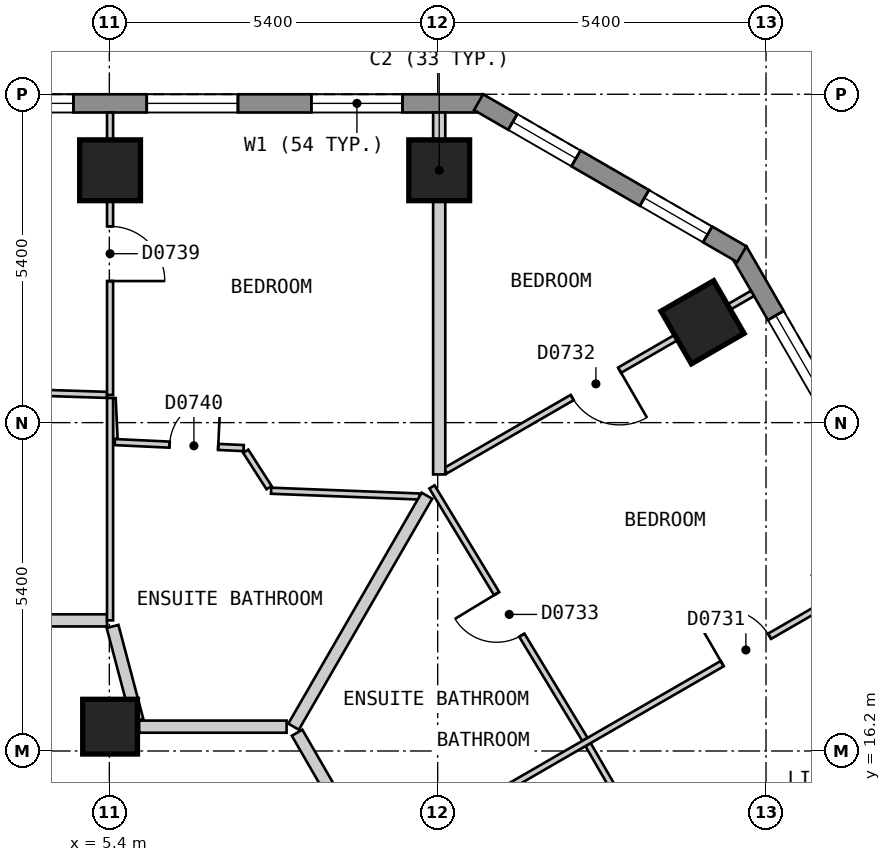
"""IFC4 building model, lengths in metres.
Left out: names, types, materials, properties, quantities, classifications, styles, units other than length and angle.
Written with IfcOpenShell. Run it as: python <this file> out.ifc"""

import sys

from ifc_helpers import new_model, si_unit, direction, frame, frame_2d, origin, origin_2d, place, context, subcontext, project, spatial, polyline, rectangle, outline, extrude, element, fill, save


model = new_model("IFC4")
c1 = context("Model", 3, precision=1e-05, world=origin(), true_north=direction((0.0, 1.0)))
c2 = subcontext(c1, "Body", "Model", "MODEL_VIEW")
j1 = project(units=[si_unit("LENGTHUNIT", "METRE"), si_unit("PLANEANGLEUNIT", "RADIAN")], contexts=[c1])
p1 = place(None, origin())
s1 = spatial("IfcSite", under=j1, at=p1, CompositionType="ELEMENT")
p2 = place(p1, origin())
s2 = spatial("IfcBuilding", under=s1, at=p2, CompositionType="ELEMENT")
p3 = place(p2, frame((0.0, 0.0, 99.0)))
s3 = spatial("IfcBuildingStorey", under=s2, at=p3, CompositionType="ELEMENT", Elevation=99.0)
for number, where, z_axis, x_axis in (
    (1, (10.825, 25.75, 0.0), (0.0, 0.0, 1.0), (-1.0, 0.0, 0.0)),
    (2, (5.412, 25.75, 0.0), (0.0, 0.0, 1.0), (-1.0, 0.0, 0.0)),
    (3, (15.156, 23.25, 0.0), (0.0, 0.0, 1.0), (-0.5, 0.866, 0.0)),
):
    element("IfcColumn", number, at=place(p3, frame(where, z_axis=z_axis, x_axis=x_axis)), inside=s3, PredefinedType="COLUMN", context=c2, shape_type="SweptSolid", body=[
        extrude(rectangle(XDim=1.0, YDim=1.0, at=origin_2d()), origin(), (0.0, 0.0, 1.0), 3.0),
    ])
p4 = place(p3, frame((5.412, 16.6, 0.0), z_axis=(0.0, 0.0, 1.0), x_axis=(-1.0, 0.0, 0.0)))
e4 = element("IfcColumn", 4, at=p4, inside=s3, PredefinedType="COLUMN", context=c2, shape_type="SweptSolid", body=[
    extrude(rectangle(XDim=0.9, YDim=0.9, at=origin_2d()), origin(), (0.0, 0.0, 1.0), 3.0),
])
p5 = place(p3, frame((11.547, 26.85, 0.0), z_axis=(0.0, 0.0, 1.0), x_axis=(-1.0, 0.0, 0.0)))
e5 = element("IfcWall", 5, at=p5, inside=s3, PredefinedType="SOLIDWALL", context=c2, shape_type="SweptSolid", body=[
    extrude(outline(polyline([(0.0, -0.15), (23.094, -0.15), (23.014, 0.15), (0.08, 0.15), (0.0, -0.15)])), origin(), (0.0, 0.0, 1.0), 2.7),
])
p6 = place(p5, frame((1.325, 0.0, 0.15)))
e6 = element("IfcOpeningElement", 6, at=p6, cuts=e5, PredefinedType="OPENING", context=c2, shape_type="SweptSolid", body=[
    extrude(rectangle(XDim=1.5, YDim=2.1, at=frame_2d((0.75, 1.05))), frame((0.0, 0.16, 0.0), z_axis=(0.0, -1.0, 0.0), x_axis=(1.0, 0.0, 0.0)), (0.0, 0.0, 1.0), 0.32),
])
p7 = place(p5, frame((4.032, 0.0, 0.15)))
e7 = element("IfcOpeningElement", 7, at=p7, cuts=e5, PredefinedType="OPENING", context=c2, shape_type="SweptSolid", body=[
    extrude(rectangle(XDim=1.5, YDim=2.1, at=frame_2d((0.75, 1.05))), frame((0.0, 0.16, 0.0), z_axis=(0.0, -1.0, 0.0), x_axis=(1.0, 0.0, 0.0)), (0.0, 0.0, 1.0), 0.32),
])
p8 = place(p5, frame((6.738, 0.0, 0.15)))
e8 = element("IfcOpeningElement", 8, at=p8, cuts=e5, PredefinedType="OPENING", context=c2, shape_type="SweptSolid", body=[
    extrude(rectangle(XDim=1.5, YDim=2.1, at=frame_2d((0.75, 1.05))), frame((0.0, 0.16, 0.0), z_axis=(0.0, -1.0, 0.0), x_axis=(1.0, 0.0, 0.0)), (0.0, 0.0, 1.0), 0.32),
])
p9 = place(p5, frame((9.445, 0.0, 0.15)))
e9 = element("IfcOpeningElement", 9, at=p9, cuts=e5, PredefinedType="OPENING", context=c2, shape_type="SweptSolid", body=[
    extrude(rectangle(XDim=1.5, YDim=2.1, at=frame_2d((0.75, 1.05))), frame((0.0, 0.16, 0.0), z_axis=(0.0, -1.0, 0.0), x_axis=(1.0, 0.0, 0.0)), (0.0, 0.0, 1.0), 0.32),
])
p10 = place(p5, frame((12.151, 0.0, 0.15)))
e10 = element("IfcOpeningElement", 10, at=p10, cuts=e5, PredefinedType="OPENING", context=c2, shape_type="SweptSolid", body=[
    extrude(rectangle(XDim=1.5, YDim=2.1, at=frame_2d((0.75, 1.05))), frame((0.0, 0.16, 0.0), z_axis=(0.0, -1.0, 0.0), x_axis=(1.0, 0.0, 0.0)), (0.0, 0.0, 1.0), 0.32),
])
p11 = place(p5, frame((14.858, 0.0, 0.15)))
e11 = element("IfcOpeningElement", 11, at=p11, cuts=e5, PredefinedType="OPENING", context=c2, shape_type="SweptSolid", body=[
    extrude(rectangle(XDim=1.5, YDim=2.1, at=frame_2d((0.75, 1.05))), frame((0.0, 0.16, 0.0), z_axis=(0.0, -1.0, 0.0), x_axis=(1.0, 0.0, 0.0)), (0.0, 0.0, 1.0), 0.32),
])
p12 = place(p5, frame((17.564, 0.0, 0.15)))
e12 = element("IfcOpeningElement", 12, at=p12, cuts=e5, PredefinedType="OPENING", context=c2, shape_type="SweptSolid", body=[
    extrude(rectangle(XDim=1.5, YDim=2.1, at=frame_2d((0.75, 1.05))), frame((0.0, 0.16, 0.0), z_axis=(0.0, -1.0, 0.0), x_axis=(1.0, 0.0, 0.0)), (0.0, 0.0, 1.0), 0.32),
])
p13 = place(p5, frame((20.271, 0.0, 0.15)))
e13 = element("IfcOpeningElement", 13, at=p13, cuts=e5, PredefinedType="OPENING", context=c2, shape_type="SweptSolid", body=[
    extrude(rectangle(XDim=1.5, YDim=2.1, at=frame_2d((0.75, 1.05))), frame((0.0, 0.16, 0.0), z_axis=(0.0, -1.0, 0.0), x_axis=(1.0, 0.0, 0.0)), (0.0, 0.0, 1.0), 0.32),
])
p14 = place(p3, frame((29.027, 1.425, 0.0), z_axis=(0.0, 0.0, 1.0), x_axis=(-0.500027479704, 0.866009537788, 0.0)))
e14 = element("IfcWall", 14, at=p14, inside=s3, PredefinedType="SOLIDWALL", context=c2, shape_type="SweptSolid", body=[
    extrude(outline(polyline([(0.0, -0.15), (26.559, -0.15), (26.478, 0.15), (0.08, 0.15), (0.0, -0.15)])), origin(), (0.0, 0.0, 1.0), 2.7),
])
p15 = place(p14, frame((1.227, 0.0, 0.15)))
e15 = element("IfcOpeningElement", 15, at=p15, cuts=e14, PredefinedType="OPENING", context=c2, shape_type="SweptSolid", body=[
    extrude(rectangle(XDim=1.5, YDim=2.1, at=frame_2d((0.75, 1.05))), frame((0.0, 0.16, 0.0), z_axis=(0.0, -1.0, 0.0), x_axis=(1.0, 0.0, 0.0)), (0.0, 0.0, 1.0), 0.32),
])
p16 = place(p14, frame((3.738, 0.0, 0.15)))
e16 = element("IfcOpeningElement", 16, at=p16, cuts=e14, PredefinedType="OPENING", context=c2, shape_type="SweptSolid", body=[
    extrude(rectangle(XDim=1.5, YDim=2.1, at=frame_2d((0.75, 1.05))), frame((0.0, 0.16, 0.0), z_axis=(0.0, -1.0, 0.0), x_axis=(1.0, 0.0, 0.0)), (0.0, 0.0, 1.0), 0.32),
])
p17 = place(p14, frame((6.25, 0.0, 0.15)))
e17 = element("IfcOpeningElement", 17, at=p17, cuts=e14, PredefinedType="OPENING", context=c2, shape_type="SweptSolid", body=[
    extrude(rectangle(XDim=1.5, YDim=2.1, at=frame_2d((0.75, 1.05))), frame((0.0, 0.16, 0.0), z_axis=(0.0, -1.0, 0.0), x_axis=(1.0, 0.0, 0.0)), (0.0, 0.0, 1.0), 0.32),
])
p18 = place(p14, frame((8.761, 0.0, 0.15)))
e18 = element("IfcOpeningElement", 18, at=p18, cuts=e14, PredefinedType="OPENING", context=c2, shape_type="SweptSolid", body=[
    extrude(rectangle(XDim=1.5, YDim=2.1, at=frame_2d((0.75, 1.05))), frame((0.0, 0.16, 0.0), z_axis=(0.0, -1.0, 0.0), x_axis=(1.0, 0.0, 0.0)), (0.0, 0.0, 1.0), 0.32),
])
p19 = place(p14, frame((11.273, 0.0, 0.15)))
e19 = element("IfcOpeningElement", 19, at=p19, cuts=e14, PredefinedType="OPENING", context=c2, shape_type="SweptSolid", body=[
    extrude(rectangle(XDim=1.5, YDim=2.1, at=frame_2d((0.75, 1.05))), frame((0.0, 0.16, 0.0), z_axis=(0.0, -1.0, 0.0), x_axis=(1.0, 0.0, 0.0)), (0.0, 0.0, 1.0), 0.32),
])
p20 = place(p14, frame((13.785, 0.0, 0.15)))
e20 = element("IfcOpeningElement", 20, at=p20, cuts=e14, PredefinedType="OPENING", context=c2, shape_type="SweptSolid", body=[
    extrude(rectangle(XDim=1.5, YDim=2.1, at=frame_2d((0.75, 1.05))), frame((0.0, 0.16, 0.0), z_axis=(0.0, -1.0, 0.0), x_axis=(1.0, 0.0, 0.0)), (0.0, 0.0, 1.0), 0.32),
])
p21 = place(p14, frame((16.296, 0.0, 0.15)))
e21 = element("IfcOpeningElement", 21, at=p21, cuts=e14, PredefinedType="OPENING", context=c2, shape_type="SweptSolid", body=[
    extrude(rectangle(XDim=1.5, YDim=2.1, at=frame_2d((0.75, 1.05))), frame((0.0, 0.16, 0.0), z_axis=(0.0, -1.0, 0.0), x_axis=(1.0, 0.0, 0.0)), (0.0, 0.0, 1.0), 0.32),
])
p22 = place(p14, frame((18.807, 0.0, 0.15)))
e22 = element("IfcOpeningElement", 22, at=p22, cuts=e14, PredefinedType="OPENING", context=c2, shape_type="SweptSolid", body=[
    extrude(rectangle(XDim=1.5, YDim=2.1, at=frame_2d((0.75, 1.05))), frame((0.0, 0.16, 0.0), z_axis=(0.0, -1.0, 0.0), x_axis=(1.0, 0.0, 0.0)), (0.0, 0.0, 1.0), 0.32),
])
p23 = place(p14, frame((21.319, 0.0, 0.15)))
e23 = element("IfcOpeningElement", 23, at=p23, cuts=e14, PredefinedType="OPENING", context=c2, shape_type="SweptSolid", body=[
    extrude(rectangle(XDim=1.5, YDim=2.1, at=frame_2d((0.75, 1.05))), frame((0.0, 0.16, 0.0), z_axis=(0.0, -1.0, 0.0), x_axis=(1.0, 0.0, 0.0)), (0.0, 0.0, 1.0), 0.32),
])
p24 = place(p14, frame((23.831, 0.0, 0.15)))
e24 = element("IfcOpeningElement", 24, at=p24, cuts=e14, PredefinedType="OPENING", context=c2, shape_type="SweptSolid", body=[
    extrude(rectangle(XDim=1.5, YDim=2.1, at=frame_2d((0.75, 1.05))), frame((0.0, 0.16, 0.0), z_axis=(0.0, -1.0, 0.0), x_axis=(1.0, 0.0, 0.0)), (0.0, 0.0, 1.0), 0.32),
])
p25 = place(p3, frame((15.802, 24.37, 0.0), z_axis=(0.0, 0.0, 1.0), x_axis=(-0.866022959057, 0.500004234368, 0.0)))
e25 = element("IfcWall", 25, at=p25, inside=s3, PredefinedType="SOLIDWALL", context=c2, shape_type="SweptSolid", body=[
    extrude(outline(polyline([(0.0, -0.15), (5.0, -0.15), (4.92, 0.15), (0.08, 0.15), (0.0, -0.15)])), origin(), (0.0, 0.0, 1.0), 2.7),
])
p26 = place(p25, frame((0.65, 0.0, 0.15)))
e26 = element("IfcOpeningElement", 26, at=p26, cuts=e25, PredefinedType="OPENING", context=c2, shape_type="SweptSolid", body=[
    extrude(rectangle(XDim=1.2, YDim=2.1, at=frame_2d((0.6, 1.05))), frame((0.0, 0.16, 0.0), z_axis=(0.0, -1.0, 0.0), x_axis=(1.0, 0.0, 0.0)), (0.0, 0.0, 1.0), 0.32),
])
p27 = place(p25, frame((3.15, 0.0, 0.15)))
e27 = element("IfcOpeningElement", 27, at=p27, cuts=e25, PredefinedType="OPENING", context=c2, shape_type="SweptSolid", body=[
    extrude(rectangle(XDim=1.2, YDim=2.1, at=frame_2d((0.6, 1.05))), frame((0.0, 0.16, 0.0), z_axis=(0.0, -1.0, 0.0), x_axis=(1.0, 0.0, 0.0)), (0.0, 0.0, 1.0), 0.32),
])
p28 = place(p3, frame((5.453, 18.248, 0.0), z_axis=(0.0, 0.0, 1.0), x_axis=(0.255687088482, -0.9667595941, 0.0)))
e28 = element("IfcWall", 28, at=p28, inside=s3, PredefinedType="PARTITIONING", context=c2, shape_type="SweptSolid", body=[
    extrude(rectangle(XDim=1.6, YDim=0.2, at=frame_2d((0.8, 0.0))), origin(), (0.0, 0.0, 1.0), 2.7),
])
p29 = place(p3, frame((8.488, 16.5, 0.0), z_axis=(0.0, 0.0, 1.0), x_axis=(0.499986836607, -0.86603300354, 0.0)))
e29 = element("IfcWall", 29, at=p29, inside=s3, PredefinedType="PARTITIONING", context=c2, shape_type="SweptSolid", body=[
    extrude(rectangle(XDim=20.09, YDim=0.2, at=frame_2d((10.045, 0.0))), origin(), (0.0, 0.0, 1.0), 2.7),
])
p30 = place(p29, frame((14.569, 0.0, 0.0)))
e30 = element("IfcOpeningElement", 30, at=p30, cuts=e29, PredefinedType="OPENING", context=c2, shape_type="SweptSolid", body=[
    extrude(rectangle(XDim=1.0, YDim=2.1, at=frame_2d((0.5, 1.05))), frame((0.0, 0.11, 0.0), z_axis=(0.0, -1.0, 0.0), x_axis=(1.0, 0.0, 0.0)), (0.0, 0.0, 1.0), 0.22),
])
p31 = place(p29, frame((4.547, 0.0, 0.0)))
e31 = element("IfcOpeningElement", 31, at=p31, cuts=e29, PredefinedType="OPENING", context=c2, shape_type="SweptSolid", body=[
    extrude(rectangle(XDim=1.0, YDim=2.1, at=frame_2d((0.5, 1.05))), frame((0.0, 0.11, 0.0), z_axis=(0.0, -1.0, 0.0), x_axis=(1.0, 0.0, 0.0)), (0.0, 0.0, 1.0), 0.22),
])
p32 = place(p3, frame((5.889, 16.6, 0.0), z_axis=(0.0, 0.0, 1.0), x_axis=(1.0, 0.0, 0.0)))
e32 = element("IfcWall", 32, at=p32, inside=s3, PredefinedType="PARTITIONING", context=c2, shape_type="SweptSolid", body=[
    extrude(rectangle(XDim=2.426, YDim=0.2, at=frame_2d((1.213, 0.0))), origin(), (0.0, 0.0, 1.0), 2.7),
])
p33 = place(p3, frame((1.75, 18.348, 0.0), z_axis=(0.0, 0.0, 1.0), x_axis=(1.0, 0.0, 0.0)))
e33 = element("IfcWall", 33, at=p33, inside=s3, PredefinedType="PARTITIONING", context=c2, shape_type="SweptSolid", body=[
    extrude(rectangle(XDim=3.612, YDim=0.2, at=frame_2d((1.806, 0.0))), origin(), (0.0, 0.0, 1.0), 2.7),
])
p34 = place(p3, frame((7.643, 21.129, 0.0), z_axis=(0.0, 0.0, 1.0), x_axis=(0.540427628168, -0.841390503104, 0.0)))
e34 = element("IfcWall", 34, at=p34, inside=s3, PredefinedType="PARTITIONING", context=c2, shape_type="SweptSolid", body=[
    extrude(rectangle(XDim=0.711, YDim=0.1, at=frame_2d((0.355, 0.0))), origin(), (0.0, 0.0, 1.0), 2.7),
])
p35 = place(p3, frame((10.706, 20.543, 0.0), z_axis=(0.0, 0.0, 1.0), x_axis=(0.518240414093, -0.855234981278, 0.0)))
e35 = element("IfcWall", 35, at=p35, inside=s3, PredefinedType="PARTITIONING", context=c2, shape_type="SweptSolid", body=[
    extrude(rectangle(XDim=4.855, YDim=0.1, at=frame_2d((2.427, 0.0))), origin(), (0.0, 0.0, 1.0), 2.7),
])
p36 = place(p35, frame((2.052, 0.0, 0.0)))
e36 = element("IfcOpeningElement", 36, at=p36, cuts=e35, PredefinedType="OPENING", context=c2, shape_type="SweptSolid", body=[
    extrude(rectangle(XDim=0.8, YDim=2.1, at=frame_2d((0.4, 1.05))), frame((0.0, 0.06, 0.0), z_axis=(0.0, -1.0, 0.0), x_axis=(1.0, 0.0, 0.0)), (0.0, 0.0, 1.0), 0.12),
])
p37 = place(p3, frame((13.273, 16.305, 0.0), z_axis=(0.0, 0.0, 1.0), x_axis=(0.500093956194, -0.865971151354, 0.0)))
e37 = element("IfcWall", 37, at=p37, inside=s3, PredefinedType="PARTITIONING", context=c2, shape_type="SweptSolid", body=[
    extrude(rectangle(XDim=4.873, YDim=0.1, at=frame_2d((2.437, 0.0))), origin(), (0.0, 0.0, 1.0), 2.7),
])
p38 = place(p37, frame((1.987, 0.0, 0.0)))
e38 = element("IfcOpeningElement", 38, at=p38, cuts=e37, PredefinedType="OPENING", context=c2, shape_type="SweptSolid", body=[
    extrude(rectangle(XDim=0.9, YDim=2.1, at=frame_2d((0.45, 1.05))), frame((0.0, 0.06, 0.0), z_axis=(0.0, -1.0, 0.0), x_axis=(1.0, 0.0, 0.0)), (0.0, 0.0, 1.0), 0.12),
])
p39 = place(p3, frame((5.454, 22.002, 0.0), z_axis=(0.0, 0.0, 1.0), x_axis=(0.048996315227, -0.998798959298, 0.0)))
e39 = element("IfcWall", 39, at=p39, inside=s3, PredefinedType="PARTITIONING", context=c2, shape_type="SweptSolid", body=[
    extrude(rectangle(XDim=0.673, YDim=0.1, at=frame_2d((0.336, 0.0))), origin(), (0.0, 0.0, 1.0), 2.7),
])
p40 = place(p3, frame((5.412, 22.005, 0.0), z_axis=(0.0, 0.0, 1.0), x_axis=(0.0, -1.0, 0.0)))
e40 = element("IfcWall", 40, at=p40, inside=s3, PredefinedType="PARTITIONING", context=c2, shape_type="SweptSolid", body=[
    extrude(rectangle(XDim=3.657, YDim=0.1, at=frame_2d((1.829, 0.0))), origin(), (0.0, 0.0, 1.0), 2.7),
])
p41 = place(p3, frame((8.06, 20.48, 0.0), z_axis=(0.0, 0.0, 1.0), x_axis=(0.999243345912, -0.038893902497, 0.0)))
e41 = element("IfcWall", 41, at=p41, inside=s3, PredefinedType="PARTITIONING", context=c2, shape_type="SweptSolid", body=[
    extrude(rectangle(XDim=2.442, YDim=0.1, at=frame_2d((1.221, 0.0))), origin(), (0.0, 0.0, 1.0), 2.7),
])
p42 = place(p3, frame((0.049, 22.228, 0.0), z_axis=(0.0, 0.0, 1.0), x_axis=(0.99947566488, -0.032378933174, 0.0)))
e42 = element("IfcWall", 42, at=p42, inside=s3, PredefinedType="PARTITIONING", context=c2, shape_type="SweptSolid", body=[
    extrude(rectangle(XDim=5.316, YDim=0.1, at=frame_2d((2.658, 0.0))), origin(), (0.0, 0.0, 1.0), 2.7),
])
p43 = place(p3, frame((5.49, 21.28, 0.0), z_axis=(0.0, 0.0, 1.0), x_axis=(0.998907627838, -0.046728482187, 0.0)))
e43 = element("IfcWall", 43, at=p43, inside=s3, PredefinedType="PARTITIONING", context=c2, shape_type="SweptSolid", body=[
    extrude(rectangle(XDim=2.121, YDim=0.1, at=frame_2d((1.061, 0.0))), origin(), (0.0, 0.0, 1.0), 2.7),
])
p44 = place(p43, frame((0.902, 0.0, 0.0)))
e44 = element("IfcOpeningElement", 44, at=p44, cuts=e43, PredefinedType="OPENING", context=c2, shape_type="SweptSolid", body=[
    extrude(rectangle(XDim=0.8, YDim=2.1, at=frame_2d((0.4, 1.05))), frame((0.0, 0.06, 0.0), z_axis=(0.0, -1.0, 0.0), x_axis=(1.0, 0.0, 0.0)), (0.0, 0.0, 1.0), 0.12),
])
p45 = place(p3, frame((5.412, 22.055, 0.0), z_axis=(0.0, 0.0, 1.0), x_axis=(0.0, 1.0, 0.0)))
e45 = element("IfcWall", 45, at=p45, inside=s3, PredefinedType="PARTITIONING", context=c2, shape_type="SweptSolid", body=[
    extrude(rectangle(XDim=4.645, YDim=0.1, at=frame_2d((2.323, 0.0))), origin(), (0.0, 0.0, 1.0), 2.7),
])
p46 = place(p45, frame((1.873, 0.0, 0.0)))
e46 = element("IfcOpeningElement", 46, at=p46, cuts=e45, PredefinedType="OPENING", context=c2, shape_type="SweptSolid", body=[
    extrude(rectangle(XDim=0.9, YDim=2.1, at=frame_2d((0.45, 1.05))), frame((0.0, 0.06, 0.0), z_axis=(0.0, -1.0, 0.0), x_axis=(1.0, 0.0, 0.0)), (0.0, 0.0, 1.0), 0.12),
])
p47 = place(p3, frame((9.83, 14.375, 0.0), z_axis=(0.0, 0.0, 1.0), x_axis=(0.866016855193, 0.500014806302, 0.0)))
e47 = element("IfcWall", 47, at=p47, inside=s3, PredefinedType="PARTITIONING", context=c2, shape_type="SweptSolid", body=[
    extrude(rectangle(XDim=10.0, YDim=0.1, at=frame_2d((5.0, 0.0))), origin(), (0.0, 0.0, 1.0), 2.7),
])
p48 = place(p47, frame((6.523, 0.0, 0.0)))
e48 = element("IfcOpeningElement", 48, at=p48, cuts=e47, PredefinedType="OPENING", context=c2, shape_type="SweptSolid", body=[
    extrude(rectangle(XDim=0.9, YDim=2.1, at=frame_2d((0.45, 1.05))), frame((0.0, 0.06, 0.0), z_axis=(0.0, -1.0, 0.0), x_axis=(1.0, 0.0, 0.0)), (0.0, 0.0, 1.0), 0.12),
])
p49 = place(p3, frame((10.926, 20.808, 0.0), z_axis=(0.0, 0.0, 1.0), x_axis=(0.86600925905, 0.500027962457, 0.0)))
e49 = element("IfcWall", 49, at=p49, inside=s3, PredefinedType="PARTITIONING", context=c2, shape_type="SweptSolid", body=[
    extrude(rectangle(XDim=5.834, YDim=0.1, at=frame_2d((2.917, 0.0))), origin(), (0.0, 0.0, 1.0), 2.7),
])
p50 = place(p49, frame((2.409, 0.0, 0.0)))
e50 = element("IfcOpeningElement", 50, at=p50, cuts=e49, PredefinedType="OPENING", context=c2, shape_type="SweptSolid", body=[
    extrude(rectangle(XDim=0.9, YDim=2.1, at=frame_2d((0.45, 1.05))), frame((0.0, 0.06, 0.0), z_axis=(0.0, -1.0, 0.0), x_axis=(1.0, 0.0, 0.0)), (0.0, 0.0, 1.0), 0.12),
])
p51 = place(p3, frame((8.43, 16.6, 0.0), z_axis=(0.0, 0.0, 1.0), x_axis=(0.500072613115, 0.865983476524, 0.0)))
e51 = element("IfcWall", 51, at=p51, inside=s3, PredefinedType="PARTITIONING", context=c2, shape_type="SweptSolid", body=[
    extrude(rectangle(XDim=4.385, YDim=0.2, at=frame_2d((2.193, 0.0))), origin(), (0.0, 0.0, 1.0), 2.7),
])
p52 = place(p3, frame((10.825, 20.748, 0.0), z_axis=(0.0, 0.0, 1.0), x_axis=(0.0, 1.0, 0.0)))
e52 = element("IfcWall", 52, at=p52, inside=s3, PredefinedType="PARTITIONING", context=c2, shape_type="SweptSolid", body=[
    extrude(rectangle(XDim=5.952, YDim=0.2, at=frame_2d((2.976, 0.0))), origin(), (0.0, 0.0, 1.0), 2.7),
])
p53 = place(p6, origin())
e53 = element("IfcWindow", 53, at=p53, inside=s3, PartitioningType="SINGLE_PANEL", PredefinedType="WINDOW", context=c2, shape_type="SweptSolid", body=[
    extrude(rectangle(XDim=1.5, YDim=2.1, at=frame_2d((0.75, 1.05))), frame((0.0, 0.03, 0.0), z_axis=(0.0, -1.0, 0.0), x_axis=(1.0, 0.0, 0.0)), (0.0, 0.0, 1.0), 0.06),
])
fill(e6, e53)
p54 = place(p7, origin())
e54 = element("IfcWindow", 54, at=p54, inside=s3, PartitioningType="SINGLE_PANEL", PredefinedType="WINDOW", context=c2, shape_type="SweptSolid", body=[
    extrude(rectangle(XDim=1.5, YDim=2.1, at=frame_2d((0.75, 1.05))), frame((0.0, 0.03, 0.0), z_axis=(0.0, -1.0, 0.0), x_axis=(1.0, 0.0, 0.0)), (0.0, 0.0, 1.0), 0.06),
])
fill(e7, e54)
p55 = place(p8, origin())
e55 = element("IfcWindow", 55, at=p55, inside=s3, PartitioningType="SINGLE_PANEL", PredefinedType="WINDOW", context=c2, shape_type="SweptSolid", body=[
    extrude(rectangle(XDim=1.5, YDim=2.1, at=frame_2d((0.75, 1.05))), frame((0.0, 0.03, 0.0), z_axis=(0.0, -1.0, 0.0), x_axis=(1.0, 0.0, 0.0)), (0.0, 0.0, 1.0), 0.06),
])
fill(e8, e55)
p56 = place(p24, origin())
e56 = element("IfcWindow", 56, at=p56, inside=s3, PartitioningType="SINGLE_PANEL", PredefinedType="WINDOW", context=c2, shape_type="SweptSolid", body=[
    extrude(rectangle(XDim=1.5, YDim=2.1, at=frame_2d((0.75, 1.05))), frame((0.0, 0.03, 0.0), z_axis=(0.0, -1.0, 0.0), x_axis=(1.0, 0.0, 0.0)), (0.0, 0.0, 1.0), 0.06),
])
fill(e24, e56)
p57 = place(p26, origin())
e57 = element("IfcWindow", 57, at=p57, inside=s3, PartitioningType="SINGLE_PANEL", PredefinedType="WINDOW", context=c2, shape_type="SweptSolid", body=[
    extrude(rectangle(XDim=1.2, YDim=2.1, at=frame_2d((0.6, 1.05))), frame((0.0, 0.03, 0.0), z_axis=(0.0, -1.0, 0.0), x_axis=(1.0, 0.0, 0.0)), (0.0, 0.0, 1.0), 0.06),
])
fill(e26, e57)
p58 = place(p27, origin())
e58 = element("IfcWindow", 58, at=p58, inside=s3, PartitioningType="SINGLE_PANEL", PredefinedType="WINDOW", context=c2, shape_type="SweptSolid", body=[
    extrude(rectangle(XDim=1.2, YDim=2.1, at=frame_2d((0.6, 1.05))), frame((0.0, 0.03, 0.0), z_axis=(0.0, -1.0, 0.0), x_axis=(1.0, 0.0, 0.0)), (0.0, 0.0, 1.0), 0.06),
])
fill(e27, e58)
p59 = place(p48, origin())
e59 = element("IfcDoor", 59, at=p59, inside=s3, OperationType="SINGLE_SWING_LEFT", PredefinedType="DOOR", context=c2, shape_type="SweptSolid", body=[
    extrude(rectangle(XDim=0.9, YDim=2.1, at=frame_2d((0.45, 1.05))), frame((0.0, 0.025, 0.0), z_axis=(0.0, -1.0, 0.0), x_axis=(1.0, 0.0, 0.0)), (0.0, 0.0, 1.0), 0.05),
])
fill(e48, e59)
p60 = place(p50, origin())
e60 = element("IfcDoor", 60, at=p60, inside=s3, OperationType="SINGLE_SWING_RIGHT", PredefinedType="DOOR", context=c2, shape_type="SweptSolid", body=[
    extrude(rectangle(XDim=0.9, YDim=2.1, at=frame_2d((0.45, 1.05))), frame((0.0, 0.025, 0.0), z_axis=(0.0, -1.0, 0.0), x_axis=(1.0, 0.0, 0.0)), (0.0, 0.0, 1.0), 0.05),
])
fill(e50, e60)
p61 = place(p36, origin())
e61 = element("IfcDoor", 61, at=p61, inside=s3, OperationType="SINGLE_SWING_LEFT", PredefinedType="DOOR", context=c2, shape_type="SweptSolid", body=[
    extrude(rectangle(XDim=0.8, YDim=2.1, at=frame_2d((0.4, 1.05))), frame((0.0, 0.025, 0.0), z_axis=(0.0, -1.0, 0.0), x_axis=(1.0, 0.0, 0.0)), (0.0, 0.0, 1.0), 0.05),
])
fill(e36, e61)
p62 = place(p46, origin())
e62 = element("IfcDoor", 62, at=p62, inside=s3, OperationType="SINGLE_SWING_LEFT", PredefinedType="DOOR", context=c2, shape_type="SweptSolid", body=[
    extrude(rectangle(XDim=0.9, YDim=2.1, at=frame_2d((0.45, 1.05))), frame((0.0, 0.025, 0.0), z_axis=(0.0, -1.0, 0.0), x_axis=(1.0, 0.0, 0.0)), (0.0, 0.0, 1.0), 0.05),
])
fill(e46, e62)
p63 = place(p44, origin())
e63 = element("IfcDoor", 63, at=p63, inside=s3, OperationType="SINGLE_SWING_RIGHT", PredefinedType="DOOR", context=c2, shape_type="SweptSolid", body=[
    extrude(rectangle(XDim=0.8, YDim=2.1, at=frame_2d((0.4, 1.05))), frame((0.0, 0.025, 0.0), z_axis=(0.0, -1.0, 0.0), x_axis=(1.0, 0.0, 0.0)), (0.0, 0.0, 1.0), 0.05),
])
fill(e44, e63)
save(model, sys.argv[1])
